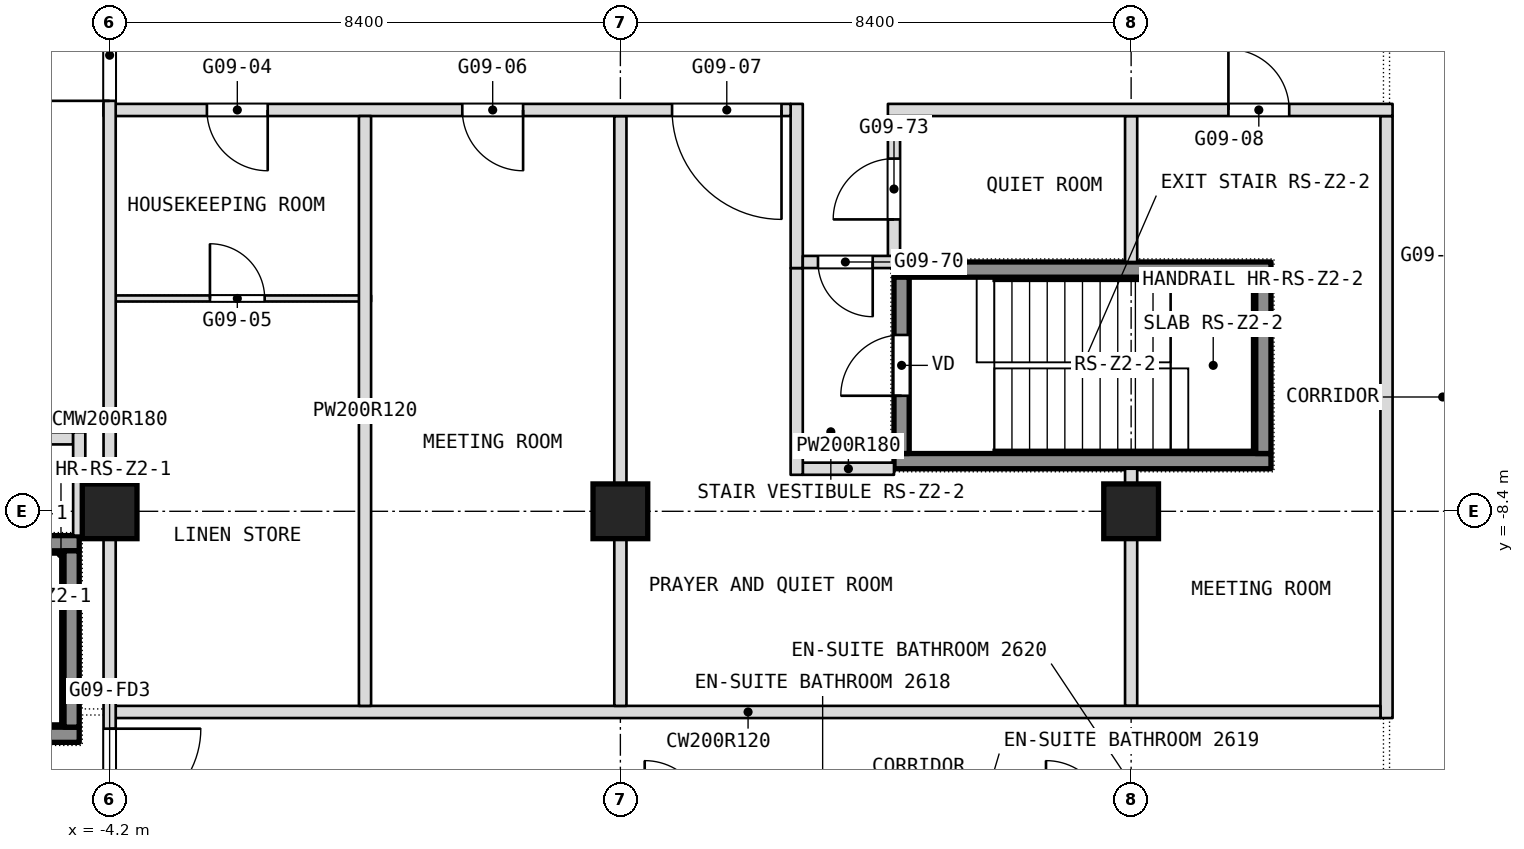
"""IFC4 building model, lengths in metres.
Left out: names, types, materials, properties, quantities, classifications, styles, units other than length and angle.
Written with IfcOpenShell. Run it as: python <this file> out.ifc"""

import sys

from ifc_helpers import new_model, si_unit, direction, frame, frame_2d, origin, origin_2d, place, context, subcontext, project, spatial, rectangle, extrude, element, fill, save


model = new_model("IFC4")
c1 = context("Model", 3, precision=1e-05, world=origin(), true_north=direction((0.0, 1.0)))
c2 = subcontext(c1, "Body", "Model", "MODEL_VIEW")
j1 = project(units=[si_unit("LENGTHUNIT", "METRE"), si_unit("PLANEANGLEUNIT", "RADIAN")], contexts=[c1])
p1 = place(None, origin())
s1 = spatial("IfcSite", under=j1, at=p1, CompositionType="ELEMENT")
p2 = place(p1, origin())
s2 = spatial("IfcBuilding", under=s1, at=p2, CompositionType="ELEMENT")
p3 = place(p2, frame((0.0, 0.0, 119.3)))
s3 = spatial("IfcBuildingStorey", under=s2, at=p3, CompositionType="ELEMENT", Elevation=119.3)
for number, where, z_axis, x_axis in (
    (1, (-4.2, -8.4, 0.0), (0.0, 0.0, 1.0), (1.0, 0.0, 0.0)),
    (2, (4.2, -8.4, 0.0), (0.0, 0.0, 1.0), (1.0, 0.0, 0.0)),
    (3, (12.6, -8.4, 0.0), (0.0, 0.0, 1.0), (1.0, 0.0, 0.0)),
):
    element("IfcColumn", number, at=place(p3, frame(where, z_axis=z_axis, x_axis=x_axis)), inside=s3, PredefinedType="COLUMN", context=c2, shape_type="SweptSolid", body=[
        extrude(rectangle(XDim=0.9, YDim=0.9, at=origin_2d()), origin(), (0.0, 0.0, 1.0), 3.6),
    ])
p4 = place(p3, frame((16.8, -11.8, 0.0), z_axis=(0.0, 0.0, 1.0), x_axis=(0.0, 1.0, 0.0)))
e4 = element("IfcWall", 4, at=p4, inside=s3, PredefinedType="PARTITIONING", context=c2, shape_type="SweptSolid", body=[
    extrude(rectangle(XDim=9.9, YDim=0.2, at=frame_2d((4.95, 0.0))), origin(), (0.0, 0.0, 1.0), 3.34),
])
p5 = place(p3, frame((12.6, -11.6, 0.0), z_axis=(0.0, 0.0, 1.0), x_axis=(0.0, 1.0, 0.0)))
e5 = element("IfcWall", 5, at=p5, inside=s3, PredefinedType="PARTITIONING", context=c2, shape_type="SweptSolid", body=[
    extrude(rectangle(XDim=3.9, YDim=0.2, at=frame_2d((1.95, 0.0))), origin(), (0.0, 0.0, 1.0), 3.34),
])
p6 = place(p3, frame((12.6, -4.3, 0.0), z_axis=(0.0, 0.0, 1.0), x_axis=(0.0, 1.0, 0.0)))
e6 = element("IfcWall", 6, at=p6, inside=s3, PredefinedType="PARTITIONING", context=c2, shape_type="SweptSolid", body=[
    extrude(rectangle(XDim=2.4, YDim=0.2, at=frame_2d((1.2, 0.0))), origin(), (0.0, 0.0, 1.0), 3.34),
])
p7 = place(p3, frame((-4.1, -11.7, 0.0), z_axis=(0.0, 0.0, 1.0), x_axis=(1.0, 0.0, 0.0)))
e7 = element("IfcWall", 7, at=p7, inside=s3, PredefinedType="PARTITIONING", context=c2, shape_type="SweptSolid", body=[
    extrude(rectangle(XDim=20.8, YDim=0.2, at=frame_2d((10.4, 0.0))), origin(), (0.0, 0.0, 1.0), 3.34),
])
p8 = place(p3, frame((8.7, -4.3, 0.0), z_axis=(0.0, 0.0, 1.0), x_axis=(0.0, 1.0, 0.0)))
e8 = element("IfcWall", 8, at=p8, inside=s3, PredefinedType="PARTITIONING", context=c2, shape_type="SweptSolid", body=[
    extrude(rectangle(XDim=2.4, YDim=0.2, at=frame_2d((1.2, 0.0))), origin(), (0.0, 0.0, 1.0), 3.34),
])
p9 = place(p8, frame((0.7, 0.0, 0.0)))
e9 = element("IfcOpeningElement", 9, at=p9, cuts=e8, PredefinedType="OPENING", context=c2, shape_type="SweptSolid", body=[
    extrude(rectangle(XDim=1.0, YDim=2.1, at=frame_2d((0.5, 1.05))), frame((0.0, 0.1, 0.0), z_axis=(0.0, -1.0, 0.0), x_axis=(1.0, 0.0, 0.0)), (0.0, 0.0, 1.0), 0.2),
])
p10 = place(p3, frame((7.2, -7.7, 0.0), z_axis=(0.0, 0.0, 1.0), x_axis=(1.0, 0.0, 0.0)))
e10 = element("IfcWall", 10, at=p10, inside=s3, PredefinedType="PARTITIONING", context=c2, shape_type="SweptSolid", body=[
    extrude(rectangle(XDim=1.5, YDim=0.2, at=frame_2d((0.75, 0.0))), origin(), (0.0, 0.0, 1.0), 3.34),
])
p11 = place(p3, frame((-8.5, -7.2, 0.0), z_axis=(0.0, 0.0, 1.0), x_axis=(1.0, 0.0, 0.0)))
e11 = element("IfcWall", 11, at=p11, inside=s3, PredefinedType="PARTITIONING", context=c2, shape_type="SweptSolid", body=[
    extrude(rectangle(XDim=3.7, YDim=0.2, at=frame_2d((1.85, 0.0))), origin(), (0.0, 0.0, 1.0), 3.34),
])
p12 = place(p11, frame((0.25, 0.0, 0.0)))
e12 = element("IfcOpeningElement", 12, at=p12, cuts=e11, PredefinedType="OPENING", context=c2, shape_type="SweptSolid", body=[
    extrude(rectangle(XDim=0.9, YDim=2.1, at=frame_2d((0.45, 1.05))), frame((0.0, 0.1, 0.0), z_axis=(0.0, -1.0, 0.0), x_axis=(1.0, 0.0, 0.0)), (0.0, 0.0, 1.0), 0.2),
])
p13 = place(p3, frame((7.1, -7.8, 0.0), z_axis=(0.0, 0.0, 1.0), x_axis=(0.0, 1.0, 0.0)))
e13 = element("IfcWall", 13, at=p13, inside=s3, PredefinedType="PARTITIONING", context=c2, shape_type="SweptSolid", body=[
    extrude(rectangle(XDim=3.4, YDim=0.2, at=frame_2d((1.7, 0.0))), origin(), (0.0, 0.0, 1.0), 3.34),
])
p14 = place(p3, frame((7.1, -4.4, 0.0), z_axis=(0.0, 0.0, 1.0), x_axis=(0.0, 1.0, 0.0)))
e14 = element("IfcWall", 14, at=p14, inside=s3, PredefinedType="PARTITIONING", context=c2, shape_type="SweptSolid", body=[
    extrude(rectangle(XDim=2.7, YDim=0.2, at=frame_2d((1.35, 0.0))), origin(), (0.0, 0.0, 1.0), 3.34),
])
p15 = place(p3, frame((-4.1, -4.9, 0.0), z_axis=(0.0, 0.0, 1.0), x_axis=(1.0, 0.0, 0.0)))
e15 = element("IfcWall", 15, at=p15, inside=s3, PredefinedType="PARTITIONING", context=c2, shape_type="SweptSolid", body=[
    extrude(rectangle(XDim=4.2, YDim=0.1, at=frame_2d((2.1, 0.0))), origin(), (0.0, 0.0, 1.0), 3.34),
])
p16 = place(p15, frame((1.55, 0.0, 0.0)))
e16 = element("IfcOpeningElement", 16, at=p16, cuts=e15, PredefinedType="OPENING", context=c2, shape_type="SweptSolid", body=[
    extrude(rectangle(XDim=0.9, YDim=2.1, at=frame_2d((0.45, 1.05))), frame((0.0, 0.05, 0.0), z_axis=(0.0, -1.0, 0.0), x_axis=(1.0, 0.0, 0.0)), (0.0, 0.0, 1.0), 0.1),
])
p17 = place(p3, frame((7.2, -4.3, 0.0), z_axis=(0.0, 0.0, 1.0), x_axis=(1.0, 0.0, 0.0)))
e17 = element("IfcWall", 17, at=p17, inside=s3, PredefinedType="PARTITIONING", context=c2, shape_type="SweptSolid", body=[
    extrude(rectangle(XDim=1.5, YDim=0.2, at=frame_2d((0.75, 0.0))), origin(), (0.0, 0.0, 1.0), 3.34),
])
p18 = place(p17, frame((0.25, 0.0, 0.0)))
e18 = element("IfcOpeningElement", 18, at=p18, cuts=e17, PredefinedType="OPENING", context=c2, shape_type="SweptSolid", body=[
    extrude(rectangle(XDim=0.9, YDim=2.1, at=frame_2d((0.45, 1.05))), frame((0.0, 0.1, 0.0), z_axis=(0.0, -1.0, 0.0), x_axis=(1.0, 0.0, 0.0)), (0.0, 0.0, 1.0), 0.2),
])
p19 = place(p3, frame((4.2, -11.6, 0.0), z_axis=(0.0, 0.0, 1.0), x_axis=(0.0, 1.0, 0.0)))
e19 = element("IfcWall", 19, at=p19, inside=s3, PredefinedType="PARTITIONING", context=c2, shape_type="SweptSolid", body=[
    extrude(rectangle(XDim=9.7, YDim=0.2, at=frame_2d((4.85, 0.0))), origin(), (0.0, 0.0, 1.0), 3.34),
])
p20 = place(p3, frame((-4.3, -1.8, 0.0), z_axis=(0.0, 0.0, 1.0), x_axis=(1.0, 0.0, 0.0)))
e20 = element("IfcWall", 20, at=p20, inside=s3, PredefinedType="PARTITIONING", context=c2, shape_type="SweptSolid", body=[
    extrude(rectangle(XDim=11.3, YDim=0.2, at=frame_2d((5.65, 0.0))), origin(), (0.0, 0.0, 1.0), 3.34),
])
p21 = place(p20, frame((1.7, 0.0, 0.0)))
e21 = element("IfcOpeningElement", 21, at=p21, cuts=e20, PredefinedType="OPENING", context=c2, shape_type="SweptSolid", body=[
    extrude(rectangle(XDim=1.0, YDim=2.1, at=frame_2d((0.5, 1.05))), frame((0.0, 0.1, 0.0), z_axis=(0.0, -1.0, 0.0), x_axis=(1.0, 0.0, 0.0)), (0.0, 0.0, 1.0), 0.2),
])
p22 = place(p20, frame((5.9, 0.0, 0.0)))
e22 = element("IfcOpeningElement", 22, at=p22, cuts=e20, PredefinedType="OPENING", context=c2, shape_type="SweptSolid", body=[
    extrude(rectangle(XDim=1.0, YDim=2.1, at=frame_2d((0.5, 1.05))), frame((0.0, 0.1, 0.0), z_axis=(0.0, -1.0, 0.0), x_axis=(1.0, 0.0, 0.0)), (0.0, 0.0, 1.0), 0.2),
])
p23 = place(p20, frame((9.35, 0.0, 0.0)))
e23 = element("IfcOpeningElement", 23, at=p23, cuts=e20, PredefinedType="OPENING", context=c2, shape_type="SweptSolid", body=[
    extrude(rectangle(XDim=1.8, YDim=2.1, at=frame_2d((0.9, 1.05))), frame((0.0, 0.1, 0.0), z_axis=(0.0, -1.0, 0.0), x_axis=(1.0, 0.0, 0.0)), (0.0, 0.0, 1.0), 0.2),
])
p24 = place(p3, frame((8.6, -1.8, 0.0), z_axis=(0.0, 0.0, 1.0), x_axis=(1.0, 0.0, 0.0)))
e24 = element("IfcWall", 24, at=p24, inside=s3, PredefinedType="PARTITIONING", context=c2, shape_type="SweptSolid", body=[
    extrude(rectangle(XDim=8.3, YDim=0.2, at=frame_2d((4.15, 0.0))), origin(), (0.0, 0.0, 1.0), 3.34),
])
p25 = place(p24, frame((5.6, 0.0, 0.0)))
e25 = element("IfcOpeningElement", 25, at=p25, cuts=e24, PredefinedType="OPENING", context=c2, shape_type="SweptSolid", body=[
    extrude(rectangle(XDim=1.0, YDim=2.1, at=frame_2d((0.5, 1.05))), frame((0.0, 0.1, 0.0), z_axis=(0.0, -1.0, 0.0), x_axis=(1.0, 0.0, 0.0)), (0.0, 0.0, 1.0), 0.2),
])
p26 = place(p3, frame((0.0, -11.6, 0.0), z_axis=(0.0, 0.0, 1.0), x_axis=(0.0, 1.0, 0.0)))
e26 = element("IfcWall", 26, at=p26, inside=s3, PredefinedType="PARTITIONING", context=c2, shape_type="SweptSolid", body=[
    extrude(rectangle(XDim=9.7, YDim=0.2, at=frame_2d((4.85, 0.0))), origin(), (0.0, 0.0, 1.0), 3.34),
])
p27 = place(p3, frame((-4.2, -13.8, 0.0), z_axis=(0.0, 0.0, 1.0), x_axis=(0.0, 1.0, 0.0)))
e27 = element("IfcWall", 27, at=p27, inside=s3, PredefinedType="PARTITIONING", context=c2, shape_type="SweptSolid", body=[
    extrude(rectangle(XDim=13.8, YDim=0.2, at=frame_2d((6.9, 0.0))), origin(), (0.0, 0.0, 1.0), 3.34),
])
p28 = place(p27, frame((12.15, 0.0, 0.0)))
e28 = element("IfcOpeningElement", 28, at=p28, cuts=e27, PredefinedType="OPENING", context=c2, shape_type="SweptSolid", body=[
    extrude(rectangle(XDim=1.5, YDim=2.1, at=frame_2d((0.75, 1.05))), frame((0.0, 0.1, 0.0), z_axis=(0.0, -1.0, 0.0), x_axis=(1.0, 0.0, 0.0)), (0.0, 0.0, 1.0), 0.2),
])
p29 = place(p27, frame((0.325, 0.0, 0.0)))
e29 = element("IfcOpeningElement", 29, at=p29, cuts=e27, PredefinedType="OPENING", context=c2, shape_type="SweptSolid", body=[
    extrude(rectangle(XDim=1.5, YDim=2.1, at=frame_2d((0.75, 1.05))), frame((0.0, 0.1, 0.0), z_axis=(0.0, -1.0, 0.0), x_axis=(1.0, 0.0, 0.0)), (0.0, 0.0, 1.0), 0.2),
])
p30 = place(p3, frame((-4.7, -8.8, 0.0), z_axis=(0.0, 0.0, 1.0), x_axis=(0.0, 1.0, 0.0)))
e30 = element("IfcWall", 30, at=p30, inside=s3, PredefinedType="PARTITIONING", context=c2, shape_type="SweptSolid", body=[
    extrude(rectangle(XDim=1.7, YDim=0.2, at=frame_2d((0.85, 0.0))), origin(), (0.0, 0.0, 1.0), 3.34),
])
p31 = place(p3, frame((-10.9, -12.075, 0.1), z_axis=(0.0, 0.0, 1.0), x_axis=(1.0, 0.0, 0.0)))
e31 = element("IfcWall", 31, at=p31, inside=s3, PredefinedType="SHEAR", context=c2, shape_type="SweptSolid", body=[
    extrude(rectangle(XDim=6.2, YDim=0.25, at=frame_2d((3.1, 0.0))), origin(), (0.0, 0.0, 1.0), 3.6),
])
p32 = place(p3, frame((-10.9, -8.925, 0.1), z_axis=(0.0, 0.0, 1.0), x_axis=(1.0, 0.0, 0.0)))
e32 = element("IfcWall", 32, at=p32, inside=s3, PredefinedType="SHEAR", context=c2, shape_type="SweptSolid", body=[
    extrude(rectangle(XDim=6.2, YDim=0.25, at=frame_2d((3.1, 0.0))), origin(), (0.0, 0.0, 1.0), 3.6),
])
p33 = place(p32, frame((0.45, 0.0, 0.0)))
e33 = element("IfcOpeningElement", 33, at=p33, cuts=e32, PredefinedType="OPENING", context=c2, shape_type="SweptSolid", body=[
    extrude(rectangle(XDim=1.0, YDim=2.1, at=frame_2d((0.5, 1.05))), frame((0.0, 0.125, 0.0), z_axis=(0.0, -1.0, 0.0), x_axis=(1.0, 0.0, 0.0)), (0.0, 0.0, 1.0), 0.25),
])
p34 = place(p3, frame((-4.825, -11.95, 0.1), z_axis=(0.0, 0.0, 1.0), x_axis=(0.0, 1.0, 0.0)))
e34 = element("IfcWall", 34, at=p34, inside=s3, PredefinedType="SHEAR", context=c2, shape_type="SweptSolid", body=[
    extrude(rectangle(XDim=2.9, YDim=0.25, at=frame_2d((1.45, 0.0))), origin(), (0.0, 0.0, 1.0), 3.6),
])
for number, where, z_axis, x_axis in (
    (35, (8.7, -7.575, 0.1), (0.0, 0.0, 1.0), (1.0, 0.0, 0.0)),
    (36, (8.7, -4.425, 0.1), (0.0, 0.0, 1.0), (1.0, 0.0, 0.0)),
):
    element("IfcWall", number, at=place(p3, frame(where, z_axis=z_axis, x_axis=x_axis)), inside=s3, PredefinedType="SHEAR", context=c2, shape_type="SweptSolid", body=[
        extrude(rectangle(XDim=6.2, YDim=0.25, at=frame_2d((3.1, 0.0))), origin(), (0.0, 0.0, 1.0), 3.6),
    ])
p35 = place(p3, frame((8.825, -7.45, 0.1), z_axis=(0.0, 0.0, 1.0), x_axis=(0.0, 1.0, 0.0)))
e37 = element("IfcWall", 37, at=p35, inside=s3, PredefinedType="SHEAR", context=c2, shape_type="SweptSolid", body=[
    extrude(rectangle(XDim=2.9, YDim=0.25, at=frame_2d((1.45, 0.0))), origin(), (0.0, 0.0, 1.0), 3.6),
])
p36 = place(p35, frame((0.95, 0.0, 0.0)))
e38 = element("IfcOpeningElement", 38, at=p36, cuts=e37, PredefinedType="OPENING", context=c2, shape_type="SweptSolid", body=[
    extrude(rectangle(XDim=1.0, YDim=2.1, at=frame_2d((0.5, 1.05))), frame((0.0, 0.125, 0.0), z_axis=(0.0, -1.0, 0.0), x_axis=(1.0, 0.0, 0.0)), (0.0, 0.0, 1.0), 0.25),
])
p37 = place(p3, frame((14.775, -7.45, 0.1), z_axis=(0.0, 0.0, 1.0), x_axis=(0.0, 1.0, 0.0)))
e39 = element("IfcWall", 39, at=p37, inside=s3, PredefinedType="SHEAR", context=c2, shape_type="SweptSolid", body=[
    extrude(rectangle(XDim=2.9, YDim=0.25, at=frame_2d((1.45, 0.0))), origin(), (0.0, 0.0, 1.0), 3.6),
])
p38 = place(p9, origin())
e40 = element("IfcDoor", 40, at=p38, inside=s3, OperationType="SINGLE_SWING_LEFT", PredefinedType="DOOR", context=c2, shape_type="SweptSolid", body=[
    extrude(rectangle(XDim=1.0, YDim=2.1, at=frame_2d((0.5, 1.05))), frame((0.0, 0.025, 0.0), z_axis=(0.0, -1.0, 0.0), x_axis=(1.0, 0.0, 0.0)), (0.0, 0.0, 1.0), 0.05),
])
fill(e9, e40)
p39 = place(p16, origin())
e41 = element("IfcDoor", 41, at=p39, inside=s3, OperationType="SINGLE_SWING_LEFT", PredefinedType="DOOR", context=c2, shape_type="SweptSolid", body=[
    extrude(rectangle(XDim=0.9, YDim=2.1, at=frame_2d((0.45, 1.05))), frame((0.0, 0.025, 0.0), z_axis=(0.0, -1.0, 0.0), x_axis=(1.0, 0.0, 0.0)), (0.0, 0.0, 1.0), 0.05),
])
fill(e16, e41)
p40 = place(p18, origin())
e42 = element("IfcDoor", 42, at=p40, inside=s3, OperationType="SINGLE_SWING_RIGHT", PredefinedType="DOOR", context=c2, shape_type="SweptSolid", body=[
    extrude(rectangle(XDim=0.9, YDim=2.1, at=frame_2d((0.45, 1.05))), frame((0.0, 0.025, 0.0), z_axis=(0.0, -1.0, 0.0), x_axis=(1.0, 0.0, 0.0)), (0.0, 0.0, 1.0), 0.05),
])
fill(e18, e42)
p41 = place(p21, origin())
e43 = element("IfcDoor", 43, at=p41, inside=s3, OperationType="SINGLE_SWING_RIGHT", PredefinedType="DOOR", context=c2, shape_type="SweptSolid", body=[
    extrude(rectangle(XDim=1.0, YDim=2.1, at=frame_2d((0.5, 1.05))), frame((0.0, 0.025, 0.0), z_axis=(0.0, -1.0, 0.0), x_axis=(1.0, 0.0, 0.0)), (0.0, 0.0, 1.0), 0.05),
])
fill(e21, e43)
p42 = place(p22, origin())
e44 = element("IfcDoor", 44, at=p42, inside=s3, OperationType="SINGLE_SWING_RIGHT", PredefinedType="DOOR", context=c2, shape_type="SweptSolid", body=[
    extrude(rectangle(XDim=1.0, YDim=2.1, at=frame_2d((0.5, 1.05))), frame((0.0, 0.025, 0.0), z_axis=(0.0, -1.0, 0.0), x_axis=(1.0, 0.0, 0.0)), (0.0, 0.0, 1.0), 0.05),
])
fill(e22, e44)
p43 = place(p23, origin())
e45 = element("IfcDoor", 45, at=p43, inside=s3, OperationType="DOUBLE_DOOR_SINGLE_SWING", PredefinedType="DOOR", context=c2, shape_type="SweptSolid", body=[
    extrude(rectangle(XDim=1.8, YDim=2.1, at=frame_2d((0.9, 1.05))), frame((0.0, 0.025, 0.0), z_axis=(0.0, -1.0, 0.0), x_axis=(1.0, 0.0, 0.0)), (0.0, 0.0, 1.0), 0.05),
])
fill(e23, e45)
p44 = place(p25, origin())
e46 = element("IfcDoor", 46, at=p44, inside=s3, OperationType="SINGLE_SWING_RIGHT", PredefinedType="DOOR", context=c2, shape_type="SweptSolid", body=[
    extrude(rectangle(XDim=1.0, YDim=2.1, at=frame_2d((0.5, 1.05))), frame((0.0, 0.025, 0.0), z_axis=(0.0, -1.0, 0.0), x_axis=(1.0, 0.0, 0.0)), (0.0, 0.0, 1.0), 0.05),
])
fill(e25, e46)
p45 = place(p36, origin())
e47 = element("IfcDoor", 47, at=p45, inside=s3, OperationType="SINGLE_SWING_LEFT", PredefinedType="DOOR", context=c2, shape_type="SweptSolid", body=[
    extrude(rectangle(XDim=1.0, YDim=2.1, at=frame_2d((0.5, 1.05))), frame((0.0, 0.025, 0.0), z_axis=(0.0, -1.0, 0.0), x_axis=(1.0, 0.0, 0.0)), (0.0, 0.0, 1.0), 0.05),
])
fill(e38, e47)
p46 = place(p28, origin())
e48 = element("IfcDoor", 48, at=p46, inside=s3, OperationType="DOUBLE_DOOR_DOUBLE_SWING", PredefinedType="DOOR", context=c2, shape_type="SweptSolid", body=[
    extrude(rectangle(XDim=1.5, YDim=2.1, at=frame_2d((0.75, 1.05))), frame((0.0, 0.025, 0.0), z_axis=(0.0, -1.0, 0.0), x_axis=(1.0, 0.0, 0.0)), (0.0, 0.0, 1.0), 0.05),
])
fill(e28, e48)
p47 = place(p29, origin())
e49 = element("IfcDoor", 49, at=p47, inside=s3, OperationType="DOUBLE_DOOR_DOUBLE_SWING", PredefinedType="DOOR", context=c2, shape_type="SweptSolid", body=[
    extrude(rectangle(XDim=1.5, YDim=2.1, at=frame_2d((0.75, 1.05))), frame((0.0, 0.025, 0.0), z_axis=(0.0, -1.0, 0.0), x_axis=(1.0, 0.0, 0.0)), (0.0, 0.0, 1.0), 0.05),
])
fill(e29, e49)
save(model, sys.argv[1])
